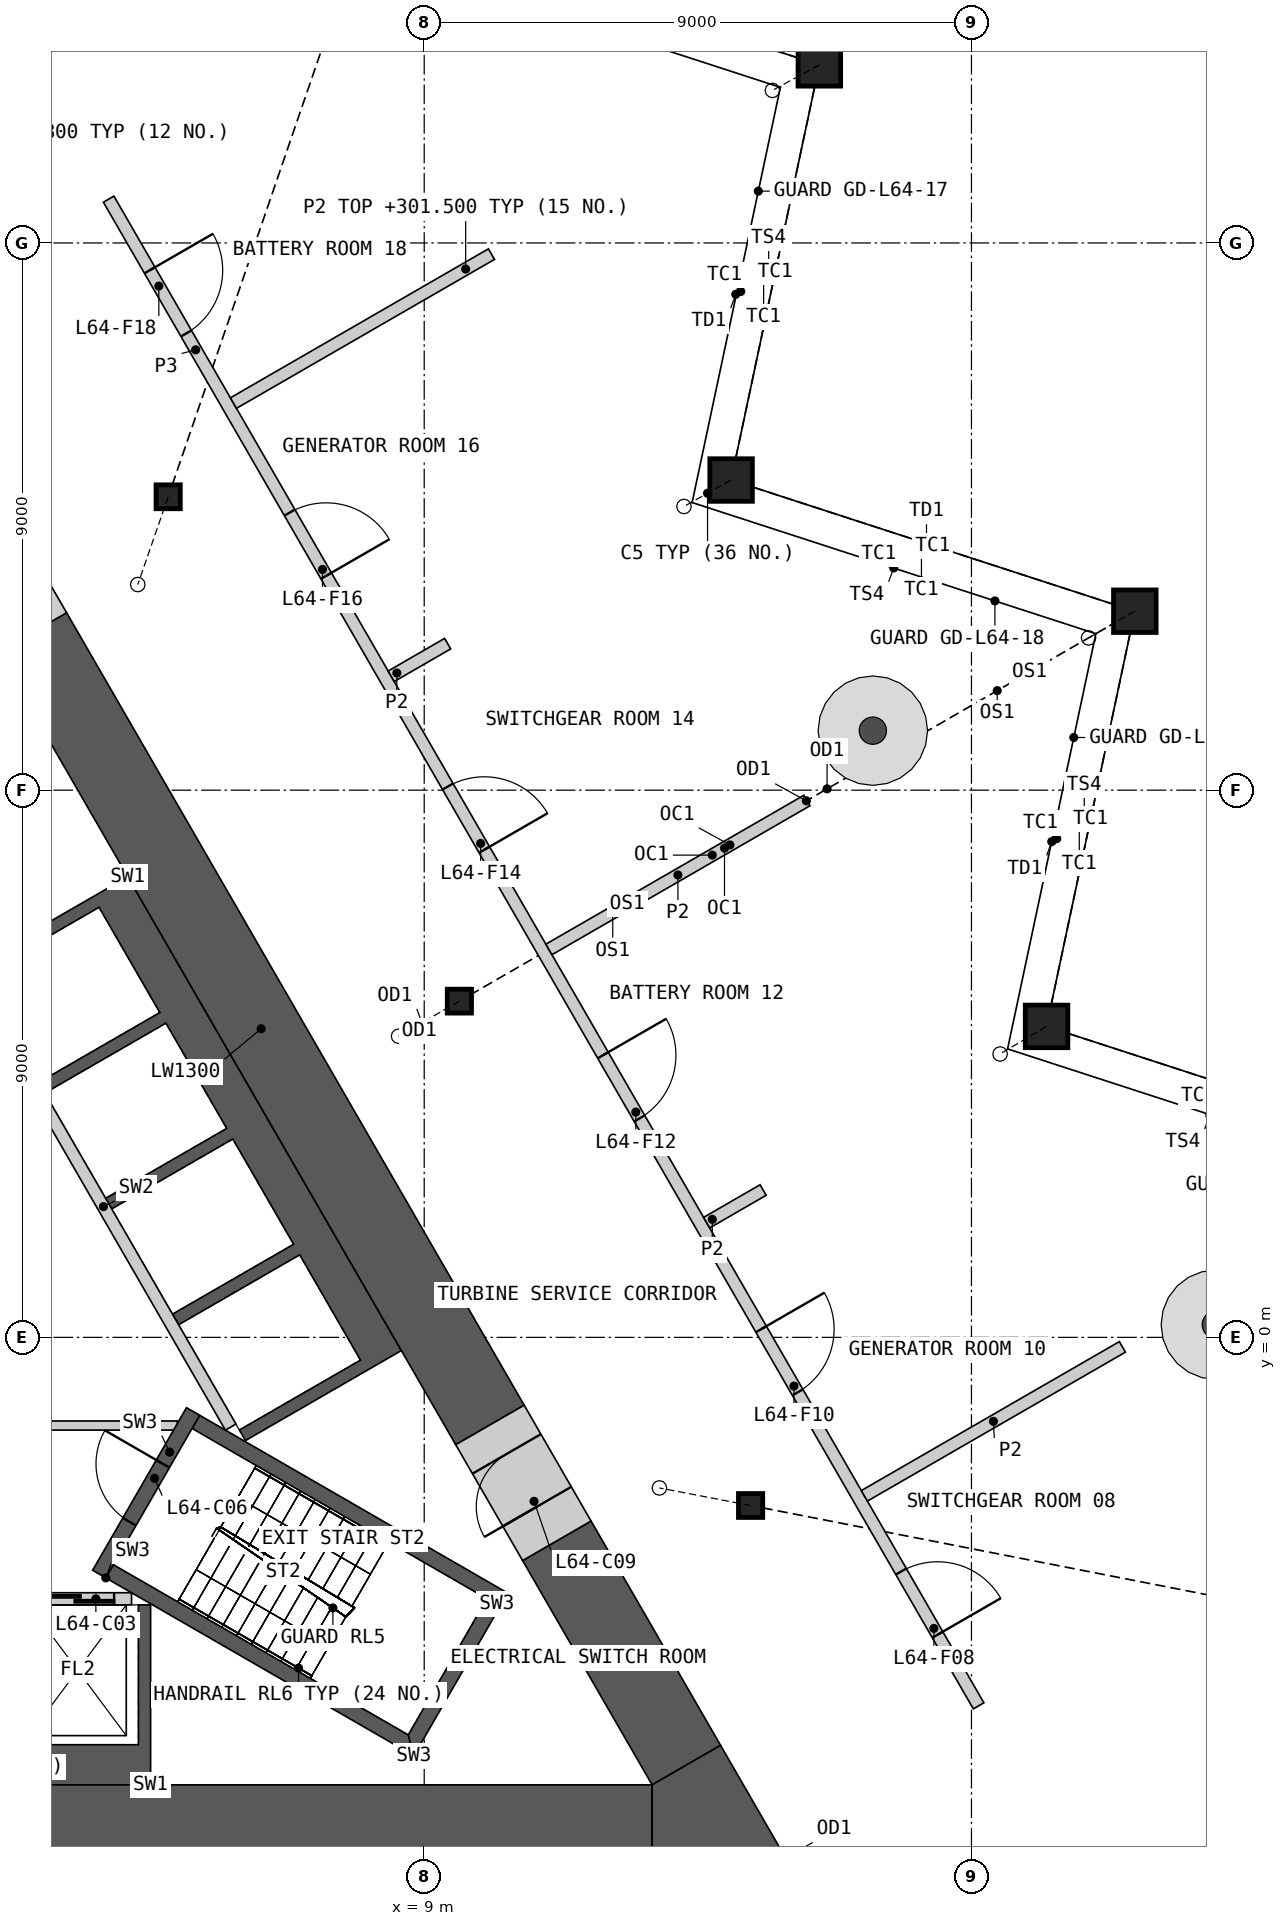
"""IFC4 building model, lengths in metres.
Left out: names, types, materials, properties, quantities, classifications, styles, units other than length and angle.
Written with IfcOpenShell. Run it as: python <this file> out.ifc"""

import sys

from ifc_helpers import new_model, si_unit, direction, frame, frame_2d, origin, origin_2d, place, context, subcontext, project, spatial, polyline, rectangle, hollow_rectangle, i_section, outline, extrude, element, fill, save


model = new_model("IFC4")
c1 = context("Model", 3, precision=1e-05, world=origin(), true_north=direction((0.0, 1.0)))
c2 = subcontext(c1, "Body", "Model", "MODEL_VIEW")
j1 = project(units=[si_unit("LENGTHUNIT", "METRE"), si_unit("PLANEANGLEUNIT", "RADIAN")], contexts=[c1])
p1 = place(None, origin())
s1 = spatial("IfcSite", under=j1, at=p1, CompositionType="ELEMENT")
p2 = place(p1, origin())
s2 = spatial("IfcBuilding", under=s1, at=p2, CompositionType="ELEMENT")
p3 = place(p2, frame((0.0, 0.0, 287.8)))
s3 = spatial("IfcBuildingStorey", under=s2, at=p3, CompositionType="ELEMENT", Elevation=287.8)
p4 = place(p3, frame((19.235, 5.115, 0.0), z_axis=(-0.054473239256, -0.032335871737, 0.99799151179), x_axis=(0.510449885427, -0.859907503437, 0.0)))
e1 = element("IfcColumn", 1, at=p4, inside=s3, PredefinedType="COLUMN", context=c2, shape_type="SweptSolid", body=[
    extrude(hollow_rectangle(XDim=0.7, YDim=0.7, WallThickness=0.045, at=origin_2d()), frame((0.0, 0.0, 0.022)), (0.0, 0.0, 1.0), 13.984),
])
p5 = place(p3, frame((20.687, 11.943, 0.0), z_axis=(-0.054266785598, -0.031310438516, 0.998035456495), x_axis=(0.499754518359, -0.866167086294, 0.0)))
e2 = element("IfcColumn", 2, at=p5, inside=s3, PredefinedType="COLUMN", context=c2, shape_type="SweptSolid", body=[
    extrude(hollow_rectangle(XDim=0.7, YDim=0.7, WallThickness=0.045, at=origin_2d()), frame((0.0, 0.0, 0.022)), (0.0, 0.0, 1.0), 13.984),
])
p6 = place(p3, frame((14.047, 14.101, 0.0), z_axis=(-0.055239020901, -0.030995808515, 0.997991939058), x_axis=(0.48934782111, -0.872088705336, 0.0)))
e3 = element("IfcColumn", 3, at=p6, inside=s3, PredefinedType="COLUMN", context=c2, shape_type="SweptSolid", body=[
    extrude(hollow_rectangle(XDim=0.7, YDim=0.7, WallThickness=0.045, at=origin_2d()), frame((0.0, 0.0, 0.022)), (0.0, 0.0, 1.0), 13.984),
])
p7 = place(p3, frame((15.499, 20.93, 0.0), z_axis=(-0.055032505232, -0.029987668094, 0.998034149281), x_axis=(0.478482407054, -0.878097139353, 0.0)))
e4 = element("IfcColumn", 4, at=p7, inside=s3, PredefinedType="COLUMN", context=c2, shape_type="SweptSolid", body=[
    extrude(hollow_rectangle(XDim=0.7, YDim=0.7, WallThickness=0.045, at=origin_2d()), frame((0.0, 0.0, 0.022)), (0.0, 0.0, 1.0), 13.984),
])
p8 = place(p3, frame((14.368, -2.765, 0.0), z_axis=(-0.106510718165, 0.020508167251, 0.99410003621), x_axis=(-0.189072648064, -0.981963102033, 0.0)))
e5 = element("IfcColumn", 5, at=p8, inside=s3, PredefinedType="COLUMN", context=c2, shape_type="SweptSolid", body=[
    extrude(i_section(OverallWidth=0.399, OverallDepth=0.393, WebThickness=0.023, FlangeThickness=0.037, at=origin_2d()), frame((0.0, 0.0, 0.021)), (0.0, 0.0, 1.0), 14.04),
])
p9 = place(p3, frame((9.578, 5.53, 0.0), z_axis=(-0.071186891711, -0.041085403321, 0.996616483951), x_axis=(0.499868889286, -0.866101087359, 0.0)))
e6 = element("IfcColumn", 6, at=p9, inside=s3, PredefinedType="COLUMN", context=c2, shape_type="SweptSolid", body=[
    extrude(i_section(OverallWidth=0.399, OverallDepth=0.393, WebThickness=0.023, FlangeThickness=0.037, at=origin_2d()), frame((0.0, 0.0, 0.016)), (0.0, 0.0, 1.0), 14.015),
])
p10 = place(p3, frame((4.789, 13.825, 0.0), z_axis=(-0.035503584336, -0.102488862595, 0.994100361404), x_axis=(0.944910039342, -0.327330135415, 0.0)))
e7 = element("IfcColumn", 7, at=p10, inside=s3, PredefinedType="COLUMN", context=c2, shape_type="SweptSolid", body=[
    extrude(i_section(OverallWidth=0.399, OverallDepth=0.393, WebThickness=0.023, FlangeThickness=0.037, at=origin_2d()), frame((0.0, 0.0, 0.021)), (0.0, 0.0, 1.0), 14.04),
])
p11 = place(p3, origin())
e8 = element("IfcWall", 8, at=p11, inside=s3, PredefinedType="SHEAR", context=c2, shape_type="SweptSolid", body=[
    extrude(outline(polyline([(4.5, -7.36), (-4.5, -7.36), (-4.5, -4.4), (-4.3, -4.4), (-4.3, -6.7), (-2.3, -6.7), (-2.3, -4.4), (-2.1, -4.4), (-2.1, -6.7), (-0.1, -6.7), (-0.1, -4.4), (0.1, -4.4), (0.1, -6.7), (2.1, -6.7), (2.1, -4.4), (2.3, -4.4), (2.3, -6.7), (4.3, -6.7), (4.3, -4.4), (4.5, -4.4), (4.5, -7.36)])), origin(), (0.0, 0.0, 1.0), 13.7),
])
p12 = place(p3, frame((-4.187, -4.3, 0.0), z_axis=(0.0, 0.0, 1.0), x_axis=(1.0, 0.0, 0.0)))
e9 = element("IfcWall", 9, at=p12, inside=s3, PredefinedType="SOLIDWALL", context=c2, shape_type="SweptSolid", body=[
    extrude(rectangle(XDim=8.373, YDim=0.2, at=frame_2d((4.187, 0.0))), origin(), (0.0, 0.0, 1.0), 13.7),
])
p13 = place(p12, frame((0.287, 0.0, 0.0)))
e10 = element("IfcOpeningElement", 10, at=p13, cuts=e9, PredefinedType="OPENING", context=c2, shape_type="SweptSolid", body=[
    extrude(rectangle(XDim=1.2, YDim=2.1, at=frame_2d((0.6, 1.05))), frame((0.0, 0.11, 0.0), z_axis=(0.0, -1.0, 0.0), x_axis=(1.0, 0.0, 0.0)), (0.0, 0.0, 1.0), 0.22),
])
p14 = place(p12, frame((2.387, 0.0, 0.0)))
e11 = element("IfcOpeningElement", 11, at=p14, cuts=e9, PredefinedType="OPENING", context=c2, shape_type="SweptSolid", body=[
    extrude(rectangle(XDim=1.4, YDim=2.1, at=frame_2d((0.7, 1.05))), frame((0.0, 0.11, 0.0), z_axis=(0.0, -1.0, 0.0), x_axis=(1.0, 0.0, 0.0)), (0.0, 0.0, 1.0), 0.22),
])
p15 = place(p12, frame((6.887, 0.0, 0.0)))
e12 = element("IfcOpeningElement", 12, at=p15, cuts=e9, PredefinedType="OPENING", context=c2, shape_type="SweptSolid", body=[
    extrude(rectangle(XDim=1.2, YDim=2.1, at=frame_2d((0.6, 1.05))), frame((0.0, 0.11, 0.0), z_axis=(0.0, -1.0, 0.0), x_axis=(1.0, 0.0, 0.0)), (0.0, 0.0, 1.0), 0.22),
])
p16 = place(p3, origin())
e13 = element("IfcWall", 13, at=p16, inside=s3, PredefinedType="SHEAR", context=c2, shape_type="SweptSolid", body=[
    extrude(outline(polyline([(4.124, 7.577), (8.624, -0.217), (8.231, -0.444), (6.061, -1.697), (5.96, -1.524), (7.952, -0.374), (6.952, 1.358), (4.96, 0.208), (4.861, 0.381), (6.852, 1.531), (5.852, 3.263), (3.861, 2.113), (3.76, 2.287), (5.752, 3.437), (4.752, 5.169), (2.76, 4.019), (2.66, 4.192), (4.652, 5.342), (3.652, 7.074), (1.66, 5.924), (1.561, 6.097), (3.731, 7.35), (4.124, 7.577)])), origin(), (0.0, 0.0, 1.0), 13.7),
])
p17 = place(p3, frame((5.817, -1.476, 0.0), z_axis=(0.0, 0.0, 1.0), x_axis=(-0.500002616675, 0.866023893041, 0.0)))
e14 = element("IfcWall", 14, at=p17, inside=s3, PredefinedType="SOLIDWALL", context=c2, shape_type="SweptSolid", body=[
    extrude(rectangle(XDim=8.373, YDim=0.2, at=frame_2d((4.187, 0.0))), origin(), (0.0, 0.0, 1.0), 13.7),
])
p18 = place(p3, frame((-4.941, -1.45, 0.0), z_axis=(0.0, 0.0, 1.0), x_axis=(1.0, 0.0, 0.0)))
e15 = element("IfcWall", 15, at=p18, inside=s3, PredefinedType="PARTITIONING", context=c2, shape_type="SweptSolid", body=[
    extrude(rectangle(XDim=9.882, YDim=0.15, at=frame_2d((4.941, 0.0))), origin(), (0.0, 0.0, 1.0), 13.7),
])
p19 = place(p18, frame((4.391, 0.0, 0.0)))
e16 = element("IfcOpeningElement", 16, at=p19, cuts=e15, PredefinedType="OPENING", context=c2, shape_type="SweptSolid", body=[
    extrude(rectangle(XDim=1.1, YDim=2.1, at=frame_2d((0.55, 1.05))), frame((0.0, 0.085, 0.0), z_axis=(0.0, -1.0, 0.0), x_axis=(1.0, 0.0, 0.0)), (0.0, 0.0, 1.0), 0.17),
])
p20 = place(p3, origin())
e17 = element("IfcWall", 17, at=p20, inside=s3, PredefinedType="SHEAR", context=c2, shape_type="SweptSolid", body=[
    extrude(outline(polyline([(3.763, -3.956), (8.83, -6.881), (8.738, -6.539), (3.888, -3.739), (3.763, -3.956)])), origin(), (0.0, 0.0, 1.0), 13.7),
])
p21 = place(p3, origin())
e18 = element("IfcWall", 18, at=p21, inside=s3, PredefinedType="SHEAR", context=c2, shape_type="SweptSolid", body=[
    extrude(outline(polyline([(8.83, -6.881), (10.374, -4.206), (10.032, -4.298), (8.738, -6.539), (8.83, -6.881)])), origin(), (0.0, 0.0, 1.0), 13.7),
])
p22 = place(p3, origin())
e19 = element("IfcWall", 19, at=p22, inside=s3, PredefinedType="SHEAR", context=c2, shape_type="SweptSolid", body=[
    extrude(outline(polyline([(10.032, -4.298), (10.374, -4.206), (5.307, -1.281), (5.182, -1.498), (10.032, -4.298)])), origin(), (0.0, 0.0, 1.0), 13.7),
])
p23 = place(p3, frame((3.655, -3.893, 0.0), z_axis=(0.0, 0.0, 1.0), x_axis=(0.499982516597, 0.866035497597, 0.0)))
e20 = element("IfcWall", 20, at=p23, inside=s3, PredefinedType="SHEAR", context=c2, shape_type="SweptSolid", body=[
    extrude(rectangle(XDim=3.088, YDim=0.25, at=frame_2d((1.544, 0.0))), origin(), (0.0, 0.0, 1.0), 13.7),
])
p24 = place(p23, frame((0.994, 0.0, 0.0)))
e21 = element("IfcOpeningElement", 21, at=p24, cuts=e20, PredefinedType="OPENING", context=c2, shape_type="SweptSolid", body=[
    extrude(rectangle(XDim=1.1, YDim=2.1, at=frame_2d((0.55, 1.05))), frame((0.0, 0.135, 0.0), z_axis=(0.0, -1.0, 0.0), x_axis=(1.0, 0.0, 0.0)), (0.0, 0.0, 1.0), 0.27),
])
p25 = place(p3, frame((-12.748, -8.01, 0.0), z_axis=(0.0, 0.0, 1.0), x_axis=(1.0, 0.0, 0.0)))
e22 = element("IfcWall", 22, at=p25, inside=s3, PredefinedType="SHEAR", context=c2, shape_type="SweptSolid", body=[
    extrude(rectangle(XDim=25.497, YDim=1.3, at=frame_2d((12.748, 0.0))), origin(), (0.0, 0.0, 1.0), 13.7),
])
p26 = place(p3, frame((10.081, -1.441, 0.0), z_axis=(0.0, 0.0, 1.0), x_axis=(-0.500012180433, 0.866018371294, 0.0)))
e23 = element("IfcWall", 23, at=p26, inside=s3, PredefinedType="SHEAR", context=c2, shape_type="SweptSolid", body=[
    extrude(rectangle(XDim=15.05, YDim=1.3, at=frame_2d((7.525, 0.0))), origin(), (0.0, 0.0, 1.0), 13.7),
])
p27 = place(p3, frame((13.311, -7.035, 0.0), z_axis=(0.0, 0.0, 1.0), x_axis=(-0.500003555838, 0.866023350811, 0.0)))
e24 = element("IfcWall", 24, at=p27, inside=s3, PredefinedType="SHEAR", context=c2, shape_type="SweptSolid", body=[
    extrude(rectangle(XDim=4.26, YDim=1.3, at=frame_2d((2.13, 0.0))), origin(), (0.0, 0.0, 1.0), 13.7),
])
p28 = place(p3, origin())
e25 = element("IfcWall", 25, at=p28, inside=s3, PredefinedType="SHEAR", context=c2, shape_type="SweptSolid", body=[
    extrude(outline(polyline([(12.748, -8.66), (12.748, -7.36), (13.874, -6.71), (15.0, -8.66), (12.748, -8.66)])), origin(), (0.0, 0.0, 1.0), 13.7),
])
p29 = place(p3, frame((11.181, -3.346, 0.0), z_axis=(0.0, 0.0, 1.0), x_axis=(-0.499946605688, 0.86605622881, 0.0)))
e26 = element("IfcWall", 26, at=p29, inside=s3, PredefinedType="SHEAR", context=c2, shape_type="SweptSolid", body=[
    extrude(rectangle(XDim=2.2, YDim=1.3, at=frame_2d((1.1, 0.0))), origin(), (0.0, 0.0, 1.0), 13.7),
])
p30 = place(p29, frame((0.65, 0.0, 0.0)))
e27 = element("IfcOpeningElement", 27, at=p30, cuts=e26, PredefinedType="OPENING", context=c2, shape_type="SweptSolid", body=[
    extrude(rectangle(XDim=1.0, YDim=2.1, at=frame_2d((0.5, 1.05))), frame((0.0, 0.66, 0.0), z_axis=(0.0, -1.0, 0.0), x_axis=(1.0, 0.0, 0.0)), (0.0, 0.0, 1.0), 1.32),
])
p31 = place(p3, frame((2.556, 11.593, 0.0), z_axis=(0.0, 0.0, 1.0), x_axis=(-0.499946605688, 0.86605622881, 0.0)))
e28 = element("IfcWall", 28, at=p31, inside=s3, PredefinedType="SHEAR", context=c2, shape_type="SweptSolid", body=[
    extrude(rectangle(XDim=2.2, YDim=1.3, at=frame_2d((1.1, 0.0))), origin(), (0.0, 0.0, 1.0), 13.7),
])
p32 = place(p31, frame((0.65, 0.0, 0.0)))
e29 = element("IfcOpeningElement", 29, at=p32, cuts=e28, PredefinedType="OPENING", context=c2, shape_type="SweptSolid", body=[
    extrude(rectangle(XDim=1.0, YDim=2.1, at=frame_2d((0.5, 1.05))), frame((0.0, 0.66, 0.0), z_axis=(0.0, -1.0, 0.0), x_axis=(1.0, 0.0, 0.0)), (0.0, 0.0, 1.0), 1.32),
])
p33 = place(p3, frame((3.811, 18.72, 0.0), z_axis=(0.0, 0.0, 1.0), x_axis=(0.49999867524, -0.866026168633, 0.0)))
e30 = element("IfcWall", 30, at=p33, inside=s3, PredefinedType="PARTITIONING", context=c2, shape_type="SweptSolid", body=[
    extrude(rectangle(XDim=28.614, YDim=0.2, at=frame_2d((14.307, 0.0))), origin(), (0.0, 0.0, 1.0), 13.7),
])
p34 = place(p33, frame((26.064, 0.0, 0.0)))
e31 = element("IfcOpeningElement", 31, at=p34, cuts=e30, PredefinedType="OPENING", context=c2, shape_type="SweptSolid", body=[
    extrude(rectangle(XDim=1.2, YDim=2.1, at=frame_2d((0.6, 1.05))), frame((0.0, 0.11, 0.0), z_axis=(0.0, -1.0, 0.0), x_axis=(1.0, 0.0, 0.0)), (0.0, 0.0, 1.0), 0.22),
])
p35 = place(p33, frame((21.461, 0.0, 0.0)))
e32 = element("IfcOpeningElement", 32, at=p35, cuts=e30, PredefinedType="OPENING", context=c2, shape_type="SweptSolid", body=[
    extrude(rectangle(XDim=1.2, YDim=2.1, at=frame_2d((0.6, 1.05))), frame((0.0, 0.11, 0.0), z_axis=(0.0, -1.0, 0.0), x_axis=(1.0, 0.0, 0.0)), (0.0, 0.0, 1.0), 0.22),
])
p36 = place(p33, frame((16.259, 0.0, 0.0)))
e33 = element("IfcOpeningElement", 33, at=p36, cuts=e30, PredefinedType="OPENING", context=c2, shape_type="SweptSolid", body=[
    extrude(rectangle(XDim=1.2, YDim=2.1, at=frame_2d((0.6, 1.05))), frame((0.0, 0.11, 0.0), z_axis=(0.0, -1.0, 0.0), x_axis=(1.0, 0.0, 0.0)), (0.0, 0.0, 1.0), 0.22),
])
p37 = place(p33, frame((11.156, 0.0, 0.0)))
e34 = element("IfcOpeningElement", 34, at=p37, cuts=e30, PredefinedType="OPENING", context=c2, shape_type="SweptSolid", body=[
    extrude(rectangle(XDim=1.2, YDim=2.1, at=frame_2d((0.6, 1.05))), frame((0.0, 0.11, 0.0), z_axis=(0.0, -1.0, 0.0), x_axis=(1.0, 0.0, 0.0)), (0.0, 0.0, 1.0), 0.22),
])
p38 = place(p33, frame((5.953, 0.0, 0.0)))
e35 = element("IfcOpeningElement", 35, at=p38, cuts=e30, PredefinedType="OPENING", context=c2, shape_type="SweptSolid", body=[
    extrude(rectangle(XDim=1.2, YDim=2.1, at=frame_2d((0.6, 1.05))), frame((0.0, 0.11, 0.0), z_axis=(0.0, -1.0, 0.0), x_axis=(1.0, 0.0, 0.0)), (0.0, 0.0, 1.0), 0.22),
])
p39 = place(p33, frame((1.351, 0.0, 0.0)))
e36 = element("IfcOpeningElement", 36, at=p39, cuts=e30, PredefinedType="OPENING", context=c2, shape_type="SweptSolid", body=[
    extrude(rectangle(XDim=1.2, YDim=2.1, at=frame_2d((0.6, 1.05))), frame((0.0, 0.11, 0.0), z_axis=(0.0, -1.0, 0.0), x_axis=(1.0, 0.0, 0.0)), (0.0, 0.0, 1.0), 0.22),
])
for number, where, z_axis, x_axis in (
    (37, (5.863, 15.366, 0.0), (0.0, 0.0, 1.0), (0.866, 0.5, 0.0)),
    (38, (11.051, 6.38, 0.0), (0.0, 0.0, 1.0), (0.866, 0.5, 0.0)),
    (39, (16.239, -2.606, 0.0), (0.0, 0.0, 1.0), (0.866, 0.5, 0.0)),
):
    element("IfcWall", number, at=place(p3, frame(where, z_axis=z_axis, x_axis=x_axis)), inside=s3, PredefinedType="PARTITIONING", context=c2, shape_type="SweptSolid", body=[
        extrude(rectangle(XDim=4.9, YDim=0.2, at=frame_2d((2.45, 0.0))), origin(), (0.0, 0.0, 1.0), 13.7),
    ])
for number, where, z_axis, x_axis in (
    (40, (8.457, 10.873, 0.0), (0.0, 0.0, 1.0), (0.866, 0.5, 0.0)),
    (41, (13.645, 1.887, 0.0), (0.0, 0.0, 1.0), (0.866, 0.5, 0.0)),
):
    element("IfcWall", number, at=place(p3, frame(where, z_axis=z_axis, x_axis=x_axis)), inside=s3, PredefinedType="PARTITIONING", context=c2, shape_type="SweptSolid", body=[
        extrude(rectangle(XDim=1.073, YDim=0.2, at=frame_2d((0.536, 0.0))), origin(), (0.0, 0.0, 1.0), 13.7),
    ])
p40 = place(p15, origin())
e42 = element("IfcDoor", 42, at=p40, inside=s3, OperationType="SLIDING_TO_LEFT", PredefinedType="DOOR", context=c2, shape_type="SweptSolid", body=[
    extrude(rectangle(XDim=1.2, YDim=2.1, at=frame_2d((0.6, 1.05))), frame((0.0, 0.025, 0.0), z_axis=(0.0, -1.0, 0.0), x_axis=(1.0, 0.0, 0.0)), (0.0, 0.0, 1.0), 0.05),
])
fill(e12, e42)
p41 = place(p24, origin())
e43 = element("IfcDoor", 43, at=p41, inside=s3, OperationType="SINGLE_SWING_RIGHT", PredefinedType="DOOR", context=c2, shape_type="SweptSolid", body=[
    extrude(rectangle(XDim=1.1, YDim=2.1, at=frame_2d((0.55, 1.05))), frame((0.0, 0.025, 0.0), z_axis=(0.0, -1.0, 0.0), x_axis=(1.0, 0.0, 0.0)), (0.0, 0.0, 1.0), 0.05),
])
fill(e21, e43)
p42 = place(p30, origin())
e44 = element("IfcDoor", 44, at=p42, inside=s3, OperationType="SINGLE_SWING_LEFT", PredefinedType="DOOR", context=c2, shape_type="SweptSolid", body=[
    extrude(rectangle(XDim=1.0, YDim=2.1, at=frame_2d((0.5, 1.05))), frame((0.0, 0.405, 0.0), z_axis=(0.0, -1.0, 0.0), x_axis=(1.0, 0.0, 0.0)), (0.0, 0.0, 1.0), 0.05),
])
fill(e27, e44)
p43 = place(p34, origin())
e45 = element("IfcDoor", 45, at=p43, inside=s3, OperationType="SINGLE_SWING_RIGHT", PredefinedType="DOOR", context=c2, shape_type="SweptSolid", body=[
    extrude(rectangle(XDim=1.2, YDim=2.1, at=frame_2d((0.6, 1.05))), frame((0.0, 0.025, 0.0), z_axis=(0.0, -1.0, 0.0), x_axis=(1.0, 0.0, 0.0)), (0.0, 0.0, 1.0), 0.05),
])
fill(e31, e45)
p44 = place(p35, origin())
e46 = element("IfcDoor", 46, at=p44, inside=s3, OperationType="SINGLE_SWING_LEFT", PredefinedType="DOOR", context=c2, shape_type="SweptSolid", body=[
    extrude(rectangle(XDim=1.2, YDim=2.1, at=frame_2d((0.6, 1.05))), frame((0.0, 0.025, 0.0), z_axis=(0.0, -1.0, 0.0), x_axis=(1.0, 0.0, 0.0)), (0.0, 0.0, 1.0), 0.05),
])
fill(e32, e46)
p45 = place(p36, origin())
e47 = element("IfcDoor", 47, at=p45, inside=s3, OperationType="SINGLE_SWING_LEFT", PredefinedType="DOOR", context=c2, shape_type="SweptSolid", body=[
    extrude(rectangle(XDim=1.2, YDim=2.1, at=frame_2d((0.6, 1.05))), frame((0.0, 0.025, 0.0), z_axis=(0.0, -1.0, 0.0), x_axis=(1.0, 0.0, 0.0)), (0.0, 0.0, 1.0), 0.05),
])
fill(e33, e47)
p46 = place(p37, origin())
e48 = element("IfcDoor", 48, at=p46, inside=s3, OperationType="SINGLE_SWING_RIGHT", PredefinedType="DOOR", context=c2, shape_type="SweptSolid", body=[
    extrude(rectangle(XDim=1.2, YDim=2.1, at=frame_2d((0.6, 1.05))), frame((0.0, 0.025, 0.0), z_axis=(0.0, -1.0, 0.0), x_axis=(1.0, 0.0, 0.0)), (0.0, 0.0, 1.0), 0.05),
])
fill(e34, e48)
p47 = place(p38, origin())
e49 = element("IfcDoor", 49, at=p47, inside=s3, OperationType="SINGLE_SWING_RIGHT", PredefinedType="DOOR", context=c2, shape_type="SweptSolid", body=[
    extrude(rectangle(XDim=1.2, YDim=2.1, at=frame_2d((0.6, 1.05))), frame((0.0, 0.025, 0.0), z_axis=(0.0, -1.0, 0.0), x_axis=(1.0, 0.0, 0.0)), (0.0, 0.0, 1.0), 0.05),
])
fill(e35, e49)
p48 = place(p39, origin())
e50 = element("IfcDoor", 50, at=p48, inside=s3, OperationType="SINGLE_SWING_LEFT", PredefinedType="DOOR", context=c2, shape_type="SweptSolid", body=[
    extrude(rectangle(XDim=1.2, YDim=2.1, at=frame_2d((0.6, 1.05))), frame((0.0, 0.025, 0.0), z_axis=(0.0, -1.0, 0.0), x_axis=(1.0, 0.0, 0.0)), (0.0, 0.0, 1.0), 0.05),
])
fill(e36, e50)
save(model, sys.argv[1])
